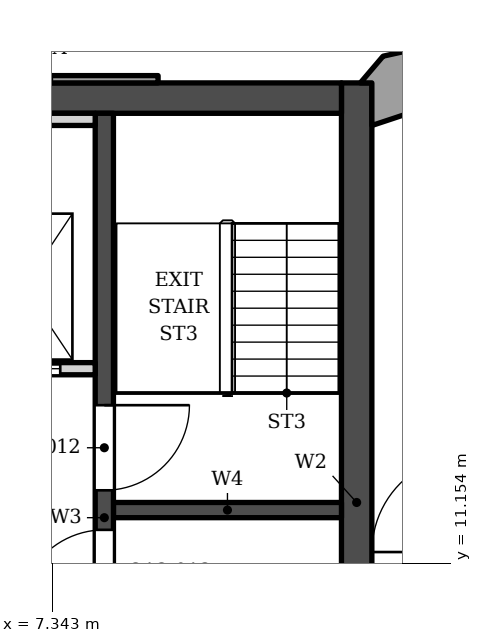
"""IFC4 building model, lengths in metres.
Left out: names, types, materials, properties, quantities, classifications, styles, units other than length and angle.
Written with IfcOpenShell. Run it as: python <this file> out.ifc"""

import sys

from ifc_helpers import new_model, si_unit, direction, frame, frame_2d, origin, place, context, subcontext, project, spatial, polyline, rectangle, outline, extrude, element, fill, save


model = new_model("IFC4")
c1 = context("Model", 3, precision=1e-05, world=origin(), true_north=direction((0.0, 1.0)))
c2 = subcontext(c1, "Body", "Model", "MODEL_VIEW")
j1 = project(units=[si_unit("LENGTHUNIT", "METRE"), si_unit("PLANEANGLEUNIT", "RADIAN")], contexts=[c1])
p1 = place(None, origin())
s1 = spatial("IfcSite", under=j1, at=p1, CompositionType="ELEMENT")
p2 = place(p1, origin())
s2 = spatial("IfcBuilding", under=s1, at=p2, CompositionType="ELEMENT")
p3 = place(p2, frame((0.0, 0.0, 287.2)))
s3 = spatial("IfcBuildingStorey", under=s2, at=p3, CompositionType="ELEMENT", Elevation=287.2)
p4 = place(p3, frame((-12.1, 18.802, 0.0), z_axis=(0.0, 0.0, 1.0), x_axis=(1.0, 0.0, 0.0)))
e1 = element("IfcWall", 1, at=p4, inside=s3, PredefinedType="SHEAR", context=c2, shape_type="SweptSolid", body=[
    extrude(rectangle(XDim=24.2, YDim=0.5, at=frame_2d((12.1, 0.0))), origin(), (0.0, 0.0, 1.0), 3.9),
])
p5 = place(p3, frame((12.35, 5.253, 0.0), z_axis=(0.0, 0.0, 1.0), x_axis=(0.0, 1.0, 0.0)))
e2 = element("IfcWall", 2, at=p5, inside=s3, PredefinedType="SHEAR", context=c2, shape_type="SweptSolid", body=[
    extrude(rectangle(XDim=13.8, YDim=0.5, at=frame_2d((6.9, 0.0))), origin(), (0.0, 0.0, 1.0), 3.9),
])
p6 = place(p3, frame((8.2, 5.253, 0.0), z_axis=(0.0, 0.0, 1.0), x_axis=(0.0, 1.0, 0.0)))
e3 = element("IfcWall", 3, at=p6, inside=s3, PredefinedType="SHEAR", context=c2, shape_type="SweptSolid", body=[
    extrude(rectangle(XDim=13.3, YDim=0.3, at=frame_2d((6.65, 0.0))), origin(), (0.0, 0.0, 1.0), 3.9),
])
p7 = place(p6, frame((7.1, 0.0, 0.0)))
e4 = element("IfcOpeningElement", 4, at=p7, cuts=e3, PredefinedType="OPENING", context=c2, shape_type="SweptSolid", body=[
    extrude(rectangle(XDim=1.4, YDim=2.1, at=frame_2d((0.7, 1.05))), frame((0.0, 0.16, 0.0), z_axis=(0.0, -1.0, 0.0), x_axis=(1.0, 0.0, 0.0)), (0.0, 0.0, 1.0), 0.32),
])
p8 = place(p6, frame((5.05, 0.0, 0.0)))
e5 = element("IfcOpeningElement", 5, at=p8, cuts=e3, PredefinedType="OPENING", context=c2, shape_type="SweptSolid", body=[
    extrude(rectangle(XDim=1.4, YDim=2.1, at=frame_2d((0.7, 1.05))), frame((0.0, 0.16, 0.0), z_axis=(0.0, -1.0, 0.0), x_axis=(1.0, 0.0, 0.0)), (0.0, 0.0, 1.0), 0.32),
])
p9 = place(p3, frame((8.35, 12.028, 0.0), z_axis=(0.0, 0.0, 1.0), x_axis=(1.0, 0.0, 0.0)))
e6 = element("IfcWall", 6, at=p9, inside=s3, PredefinedType="SHEAR", context=c2, shape_type="SweptSolid", body=[
    extrude(rectangle(XDim=3.75, YDim=0.25, at=frame_2d((1.875, 0.0))), origin(), (0.0, 0.0, 1.0), 3.9),
])
p10 = place(p3, origin())
e7 = element("IfcWall", 7, at=p10, inside=s3, PredefinedType="SOLIDWALL", context=c2, shape_type="SweptSolid", body=[
    extrude(outline(polyline([(5.484, 19.173), (5.484, 19.052), (9.084, 19.052), (9.084, 19.173), (5.484, 19.173)])), origin(), (0.0, 0.0, 1.0), 3.0),
])
p11 = place(p3, origin())
e8 = element("IfcWall", 8, at=p11, inside=s3, PredefinedType="SOLIDWALL", context=c2, shape_type="SweptSolid", body=[
    extrude(outline(polyline([(14.201, 18.883), (14.008, 19.762), (12.784, 19.492), (12.41, 19.052), (12.6, 19.052), (12.6, 18.352), (14.201, 18.883)])), origin(), (0.0, 0.0, 1.0), 3.0),
])
p12 = place(p3, frame((5.3, 14.353, 0.0), z_axis=(0.0, 0.0, 1.0), x_axis=(1.0, 0.0, 0.0)))
e9 = element("IfcWall", 9, at=p12, inside=s3, PredefinedType="SOLIDWALL", context=c2, shape_type="SweptSolid", body=[
    extrude(rectangle(XDim=2.75, YDim=0.2, at=frame_2d((1.375, 0.0))), origin(), (0.0, 0.0, 1.0), 3.73),
])
p13 = place(p12, frame((0.975, 0.0, 0.0)))
e10 = element("IfcOpeningElement", 10, at=p13, cuts=e9, PredefinedType="OPENING", context=c2, shape_type="SweptSolid", body=[
    extrude(rectangle(XDim=1.2, YDim=2.1, at=frame_2d((0.6, 1.05))), frame((0.0, 0.11, 0.0), z_axis=(0.0, -1.0, 0.0), x_axis=(1.0, 0.0, 0.0)), (0.0, 0.0, 1.0), 0.22),
])
p14 = place(p3, frame((5.5, 18.453, 0.0), z_axis=(0.0, 0.0, 1.0), x_axis=(1.0, 0.0, 0.0)))
e11 = element("IfcWall", 11, at=p14, inside=s3, PredefinedType="SOLIDWALL", context=c2, shape_type="SweptSolid", body=[
    extrude(rectangle(XDim=2.55, YDim=0.2, at=frame_2d((1.275, 0.0))), origin(), (0.0, 0.0, 1.0), 3.73),
])
p15 = place(p13, origin())
e12 = element("IfcDoor", 12, at=p15, inside=s3, OperationType="DOUBLE_DOOR_SLIDING", PredefinedType="DOOR", context=c2, shape_type="SweptSolid", body=[
    extrude(rectangle(XDim=1.2, YDim=2.1, at=frame_2d((0.6, 1.05))), frame((0.0, 0.025, 0.0), z_axis=(0.0, -1.0, 0.0), x_axis=(1.0, 0.0, 0.0)), (0.0, 0.0, 1.0), 0.05),
])
fill(e10, e12)
p16 = place(p7, origin())
e13 = element("IfcDoor", 13, at=p16, inside=s3, OperationType="SINGLE_SWING_RIGHT", PredefinedType="DOOR", context=c2, shape_type="SweptSolid", body=[
    extrude(rectangle(XDim=1.4, YDim=2.1, at=frame_2d((0.7, 1.05))), frame((0.0, 0.025, 0.0), z_axis=(0.0, -1.0, 0.0), x_axis=(1.0, 0.0, 0.0)), (0.0, 0.0, 1.0), 0.05),
])
fill(e4, e13)
p17 = place(p8, origin())
e14 = element("IfcDoor", 14, at=p17, inside=s3, OperationType="SINGLE_SWING_LEFT", PredefinedType="DOOR", context=c2, shape_type="SweptSolid", body=[
    extrude(rectangle(XDim=1.4, YDim=2.1, at=frame_2d((0.7, 1.05))), frame((0.0, 0.025, 0.0), z_axis=(0.0, -1.0, 0.0), x_axis=(1.0, 0.0, 0.0)), (0.0, 0.0, 1.0), 0.05),
])
fill(e5, e14)
save(model, sys.argv[1])
